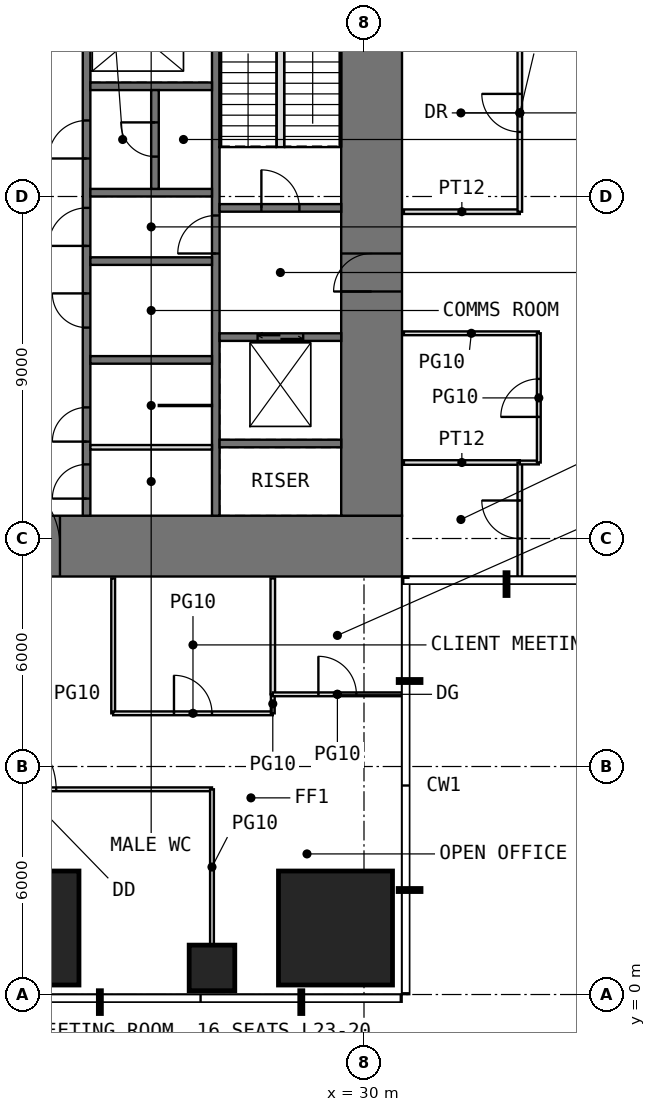
"""IFC4 building model, lengths in metres.
Left out: names, types, materials, properties, quantities, classifications, styles, units other than length and angle.
Written with IfcOpenShell. Run it as: python <this file> out.ifc"""

import sys

from ifc_helpers import new_model, si_unit, direction, frame, frame_2d, origin, origin_2d, place, context, subcontext, project, spatial, rectangle, extrude, element, fill, save


model = new_model("IFC4")
c1 = context("Model", 3, precision=1e-05, world=origin(), true_north=direction((0.0, 1.0)))
c2 = subcontext(c1, "Body", "Model", "MODEL_VIEW")
j1 = project(units=[si_unit("LENGTHUNIT", "METRE"), si_unit("PLANEANGLEUNIT", "RADIAN")], contexts=[c1])
p1 = place(None, origin())
s1 = spatial("IfcSite", under=j1, at=p1, CompositionType="ELEMENT")
p2 = place(p1, origin())
s2 = spatial("IfcBuilding", under=s1, at=p2, CompositionType="ELEMENT")
p3 = place(p2, frame((0.0, 0.0, 100.5)))
s3 = spatial("IfcBuildingStorey", under=s2, at=p3, CompositionType="ELEMENT", Elevation=100.5)
p4 = place(p3, frame((21.0, 1.75, 0.0), z_axis=(0.0, 0.0, 1.0), x_axis=(1.0, 0.0, 0.0)))
e1 = element("IfcColumn", 1, at=p4, inside=s3, PredefinedType="COLUMN", context=c2, shape_type="SweptSolid", body=[
    extrude(rectangle(XDim=3.0, YDim=3.0, at=origin_2d()), origin(), (0.0, 0.0, 1.0), 4.0),
])
p5 = place(p3, frame((26.0, 0.7, 0.0), z_axis=(0.0, 0.0, 1.0), x_axis=(1.0, 0.0, 0.0)))
e2 = element("IfcColumn", 2, at=p5, inside=s3, PredefinedType="COLUMN", context=c2, shape_type="SweptSolid", body=[
    extrude(rectangle(XDim=1.2, YDim=1.2, at=origin_2d()), origin(), (0.0, 0.0, 1.0), 4.0),
])
p6 = place(p3, frame((29.25, 1.75, 0.0), z_axis=(0.0, 0.0, 1.0), x_axis=(1.0, 0.0, 0.0)))
e3 = element("IfcColumn", 3, at=p6, inside=s3, PredefinedType="COLUMN", context=c2, shape_type="SweptSolid", body=[
    extrude(rectangle(XDim=3.0, YDim=3.0, at=origin_2d()), origin(), (0.0, 0.0, 1.0), 4.0),
])
p7 = place(p3, frame((11.0, 11.8, -0.05), z_axis=(0.0, 0.0, 1.0), x_axis=(1.0, 0.0, 0.0)))
e4 = element("IfcWall", 4, at=p7, inside=s3, PredefinedType="SHEAR", context=c2, shape_type="SweptSolid", body=[
    extrude(rectangle(XDim=20.0, YDim=1.6, at=frame_2d((10.0, 0.0))), origin(), (0.0, 0.0, 1.0), 4.0),
])
p8 = place(p7, frame((9.0, 0.0, 0.05)))
e5 = element("IfcOpeningElement", 5, at=p8, cuts=e4, PredefinedType="OPENING", context=c2, shape_type="SweptSolid", body=[
    extrude(rectangle(XDim=2.0, YDim=2.2, at=frame_2d((1.0, 1.1))), frame((0.0, 0.81, 0.0), z_axis=(0.0, -1.0, 0.0), x_axis=(1.0, 0.0, 0.0)), (0.0, 0.0, 1.0), 1.62),
])
p9 = place(p3, frame((30.2, 12.6, -0.05), z_axis=(0.0, 0.0, 1.0), x_axis=(0.0, 1.0, 0.0)))
e6 = element("IfcWall", 6, at=p9, inside=s3, PredefinedType="SHEAR", context=c2, shape_type="SweptSolid", body=[
    extrude(rectangle(XDim=16.8, YDim=1.6, at=frame_2d((8.4, 0.0))), origin(), (0.0, 0.0, 1.0), 4.0),
])
p10 = place(p9, frame((5.9, 0.0, 0.05)))
e7 = element("IfcOpeningElement", 7, at=p10, cuts=e6, PredefinedType="OPENING", context=c2, shape_type="SweptSolid", body=[
    extrude(rectangle(XDim=1.0, YDim=2.2, at=frame_2d((0.5, 1.1))), frame((0.0, 0.81, 0.0), z_axis=(0.0, -1.0, 0.0), x_axis=(1.0, 0.0, 0.0)), (0.0, 0.0, 1.0), 1.62),
])
p11 = place(p3, frame((22.7, 12.6, -0.05), z_axis=(0.0, 0.0, 1.0), x_axis=(0.0, 1.0, 0.0)))
e8 = element("IfcWall", 8, at=p11, inside=s3, PredefinedType="SHEAR", context=c2, shape_type="SweptSolid", body=[
    extrude(rectangle(XDim=16.8, YDim=0.2, at=frame_2d((8.4, 0.0))), origin(), (0.0, 0.0, 1.0), 4.0),
])
p12 = place(p11, frame((0.45, 0.0, 0.05)))
e9 = element("IfcOpeningElement", 9, at=p12, cuts=e8, PredefinedType="OPENING", context=c2, shape_type="SweptSolid", body=[
    extrude(rectangle(XDim=0.9, YDim=2.2, at=frame_2d((0.45, 1.1))), frame((0.0, 0.11, 0.0), z_axis=(0.0, -1.0, 0.0), x_axis=(1.0, 0.0, 0.0)), (0.0, 0.0, 1.0), 0.22),
])
p13 = place(p11, frame((7.1, 0.0, 0.05)))
e10 = element("IfcOpeningElement", 10, at=p13, cuts=e8, PredefinedType="OPENING", context=c2, shape_type="SweptSolid", body=[
    extrude(rectangle(XDim=1.0, YDim=2.2, at=frame_2d((0.5, 1.1))), frame((0.0, 0.11, 0.0), z_axis=(0.0, -1.0, 0.0), x_axis=(1.0, 0.0, 0.0)), (0.0, 0.0, 1.0), 0.22),
])
p14 = place(p11, frame((1.95, 0.0, 0.05)))
e11 = element("IfcOpeningElement", 11, at=p14, cuts=e8, PredefinedType="OPENING", context=c2, shape_type="SweptSolid", body=[
    extrude(rectangle(XDim=0.9, YDim=2.2, at=frame_2d((0.45, 1.1))), frame((0.0, 0.11, 0.0), z_axis=(0.0, -1.0, 0.0), x_axis=(1.0, 0.0, 0.0)), (0.0, 0.0, 1.0), 0.22),
])
p15 = place(p11, frame((4.95, 0.0, 0.05)))
e12 = element("IfcOpeningElement", 12, at=p15, cuts=e8, PredefinedType="OPENING", context=c2, shape_type="SweptSolid", body=[
    extrude(rectangle(XDim=0.9, YDim=2.2, at=frame_2d((0.45, 1.1))), frame((0.0, 0.11, 0.0), z_axis=(0.0, -1.0, 0.0), x_axis=(1.0, 0.0, 0.0)), (0.0, 0.0, 1.0), 0.22),
])
p16 = place(p11, frame((9.4, 0.0, 0.05)))
e13 = element("IfcOpeningElement", 13, at=p16, cuts=e8, PredefinedType="OPENING", context=c2, shape_type="SweptSolid", body=[
    extrude(rectangle(XDim=1.0, YDim=2.2, at=frame_2d((0.5, 1.1))), frame((0.0, 0.11, 0.0), z_axis=(0.0, -1.0, 0.0), x_axis=(1.0, 0.0, 0.0)), (0.0, 0.0, 1.0), 0.22),
])
p17 = place(p3, frame((26.1, 12.6, -0.05), z_axis=(0.0, 0.0, 1.0), x_axis=(0.0, 1.0, 0.0)))
e14 = element("IfcWall", 14, at=p17, inside=s3, PredefinedType="SHEAR", context=c2, shape_type="SweptSolid", body=[
    extrude(rectangle(XDim=16.8, YDim=0.2, at=frame_2d((8.4, 0.0))), origin(), (0.0, 0.0, 1.0), 4.0),
])
p18 = place(p17, frame((6.9, 0.0, 0.05)))
e15 = element("IfcOpeningElement", 15, at=p18, cuts=e14, PredefinedType="OPENING", context=c2, shape_type="SweptSolid", body=[
    extrude(rectangle(XDim=1.0, YDim=2.2, at=frame_2d((0.5, 1.1))), frame((0.0, 0.11, 0.0), z_axis=(0.0, -1.0, 0.0), x_axis=(1.0, 0.0, 0.0)), (0.0, 0.0, 1.0), 0.22),
])
for number, where, z_axis, x_axis in (
    (16, (22.8, 16.7, -0.05), (0.0, 0.0, 1.0), (1.0, 0.0, 0.0)),
    (17, (22.8, 19.3, -0.05), (0.0, 0.0, 1.0), (1.0, 0.0, 0.0)),
    (18, (22.8, 21.1, -0.05), (0.0, 0.0, 1.0), (1.0, 0.0, 0.0)),
    (19, (22.8, 23.9, -0.05), (0.0, 0.0, 1.0), (1.0, 0.0, 0.0)),
    (20, (26.2, 14.5, -0.05), (0.0, 0.0, 1.0), (1.0, 0.0, 0.0)),
):
    element("IfcWall", number, at=place(p3, frame(where, z_axis=z_axis, x_axis=x_axis)), inside=s3, PredefinedType="SHEAR", context=c2, shape_type="SweptSolid", body=[
        extrude(rectangle(XDim=3.2, YDim=0.2, at=frame_2d((1.6, 0.0))), origin(), (0.0, 0.0, 1.0), 4.0),
    ])
p19 = place(p3, frame((26.2, 17.3, -0.05), z_axis=(0.0, 0.0, 1.0), x_axis=(1.0, 0.0, 0.0)))
e21 = element("IfcWall", 21, at=p19, inside=s3, PredefinedType="SHEAR", context=c2, shape_type="SweptSolid", body=[
    extrude(rectangle(XDim=3.2, YDim=0.2, at=frame_2d((1.6, 0.0))), origin(), (0.0, 0.0, 1.0), 4.0),
])
p20 = place(p19, frame((1.0, 0.0, 0.05)))
e22 = element("IfcOpeningElement", 22, at=p20, cuts=e21, PredefinedType="OPENING", context=c2, shape_type="SweptSolid", body=[
    extrude(rectangle(XDim=1.2, YDim=2.2, at=frame_2d((0.6, 1.1))), frame((0.0, 0.11, 0.0), z_axis=(0.0, -1.0, 0.0), x_axis=(1.0, 0.0, 0.0)), (0.0, 0.0, 1.0), 0.22),
])
p21 = place(p3, frame((26.2, 20.7, -0.05), z_axis=(0.0, 0.0, 1.0), x_axis=(1.0, 0.0, 0.0)))
e23 = element("IfcWall", 23, at=p21, inside=s3, PredefinedType="SHEAR", context=c2, shape_type="SweptSolid", body=[
    extrude(rectangle(XDim=3.2, YDim=0.2, at=frame_2d((1.6, 0.0))), origin(), (0.0, 0.0, 1.0), 4.0),
])
p22 = place(p21, frame((1.1, 0.0, 0.05)))
e24 = element("IfcOpeningElement", 24, at=p22, cuts=e23, PredefinedType="OPENING", context=c2, shape_type="SweptSolid", body=[
    extrude(rectangle(XDim=1.0, YDim=2.2, at=frame_2d((0.5, 1.1))), frame((0.0, 0.11, 0.0), z_axis=(0.0, -1.0, 0.0), x_axis=(1.0, 0.0, 0.0)), (0.0, 0.0, 1.0), 0.22),
])
p23 = place(p3, frame((22.8, 14.4, 0.0), z_axis=(0.0, 0.0, 1.0), x_axis=(1.0, 0.0, 0.0)))
e25 = element("IfcWall", 25, at=p23, inside=s3, PredefinedType="PARTITIONING", context=c2, shape_type="SweptSolid", body=[
    extrude(rectangle(XDim=3.2, YDim=0.12, at=frame_2d((1.6, 0.0))), origin(), (0.0, 0.0, 1.0), 3.75),
])
p24 = place(p3, frame((24.6, 15.5, 0.0), z_axis=(0.0, 0.0, 1.0), x_axis=(1.0, 0.0, 0.0)))
e26 = element("IfcWall", 26, at=p24, inside=s3, PredefinedType="PARTITIONING", context=c2, shape_type="SweptSolid", body=[
    extrude(rectangle(XDim=1.4, YDim=0.03, at=frame_2d((0.7, 0.0))), origin(), (0.0, 0.0, 1.0), 3.75),
])
p25 = place(p3, frame((24.5, 21.2, -0.05), z_axis=(0.0, 0.0, 1.0), x_axis=(0.0, 1.0, 0.0)))
e27 = element("IfcWall", 27, at=p25, inside=s3, PredefinedType="SHEAR", context=c2, shape_type="SweptSolid", body=[
    extrude(rectangle(XDim=2.6, YDim=0.2, at=frame_2d((1.3, 0.0))), origin(), (0.0, 0.0, 1.0), 4.0),
])
p26 = place(p25, frame((0.85, 0.0, 0.05)))
e28 = element("IfcOpeningElement", 28, at=p26, cuts=e27, PredefinedType="OPENING", context=c2, shape_type="SweptSolid", body=[
    extrude(rectangle(XDim=0.9, YDim=2.2, at=frame_2d((0.45, 1.1))), frame((0.0, 0.11, 0.0), z_axis=(0.0, -1.0, 0.0), x_axis=(1.0, 0.0, 0.0)), (0.0, 0.0, 1.0), 0.22),
])
p27 = place(p3, frame((16.0, 5.4, 0.0), z_axis=(0.0, 0.0, 1.0), x_axis=(1.0, 0.0, 0.0)))
e29 = element("IfcWall", 29, at=p27, inside=s3, PredefinedType="PARTITIONING", context=c2, shape_type="SweptSolid", body=[
    extrude(rectangle(XDim=10.0, YDim=0.1, at=frame_2d((5.0, 0.0))), origin(), (0.0, 0.0, 1.0), 3.75),
])
p28 = place(p27, frame((4.1, 0.0, 0.0)))
e30 = element("IfcOpeningElement", 30, at=p28, cuts=e29, PredefinedType="OPENING", context=c2, shape_type="SweptSolid", body=[
    extrude(rectangle(XDim=1.8, YDim=2.4, at=frame_2d((0.9, 1.2))), frame((0.0, 0.06, 0.0), z_axis=(0.0, -1.0, 0.0), x_axis=(1.0, 0.0, 0.0)), (0.0, 0.0, 1.0), 0.12),
])
p29 = place(p3, frame((23.4, 7.4, 0.0), z_axis=(0.0, 0.0, 1.0), x_axis=(0.0, 1.0, 0.0)))
e31 = element("IfcWall", 31, at=p29, inside=s3, PredefinedType="PARTITIONING", context=c2, shape_type="SweptSolid", body=[
    extrude(rectangle(XDim=3.55, YDim=0.1, at=frame_2d((1.775, 0.0))), origin(), (0.0, 0.0, 1.0), 3.75),
])
p30 = place(p3, frame((23.4, 7.4, 0.0), z_axis=(0.0, 0.0, 1.0), x_axis=(1.0, 0.0, 0.0)))
e32 = element("IfcWall", 32, at=p30, inside=s3, PredefinedType="PARTITIONING", context=c2, shape_type="SweptSolid", body=[
    extrude(rectangle(XDim=4.2, YDim=0.1, at=frame_2d((2.1, 0.0))), origin(), (0.0, 0.0, 1.0), 3.75),
])
p31 = place(p30, frame((1.6, 0.0, 0.0)))
e33 = element("IfcOpeningElement", 33, at=p31, cuts=e32, PredefinedType="OPENING", context=c2, shape_type="SweptSolid", body=[
    extrude(rectangle(XDim=1.0, YDim=2.4, at=frame_2d((0.5, 1.2))), frame((0.0, 0.06, 0.0), z_axis=(0.0, -1.0, 0.0), x_axis=(1.0, 0.0, 0.0)), (0.0, 0.0, 1.0), 0.12),
])
p32 = place(p3, frame((26.0, 1.31, 0.0), z_axis=(0.0, 0.0, 1.0), x_axis=(0.0, 1.0, 0.0)))
e34 = element("IfcWall", 34, at=p32, inside=s3, PredefinedType="PARTITIONING", context=c2, shape_type="SweptSolid", body=[
    extrude(rectangle(XDim=4.09, YDim=0.1, at=frame_2d((2.045, 0.0))), origin(), (0.0, 0.0, 1.0), 3.75),
])
p33 = place(p3, frame((27.6, 7.4, 0.0), z_axis=(0.0, 0.0, 1.0), x_axis=(0.0, 1.0, 0.0)))
e35 = element("IfcWall", 35, at=p33, inside=s3, PredefinedType="PARTITIONING", context=c2, shape_type="SweptSolid", body=[
    extrude(rectangle(XDim=0.5, YDim=0.1, at=frame_2d((0.25, 0.0))), origin(), (0.0, 0.0, 1.0), 3.75),
])
p34 = place(p3, frame((27.6, 7.9, 0.0), z_axis=(0.0, 0.0, 1.0), x_axis=(0.0, 1.0, 0.0)))
e36 = element("IfcWall", 36, at=p34, inside=s3, PredefinedType="PARTITIONING", context=c2, shape_type="SweptSolid", body=[
    extrude(rectangle(XDim=3.05, YDim=0.12, at=frame_2d((1.525, 0.0))), origin(), (0.0, 0.0, 1.0), 3.75),
])
p35 = place(p3, frame((27.6, 7.9, 0.0), z_axis=(0.0, 0.0, 1.0), x_axis=(1.0, 0.0, 0.0)))
e37 = element("IfcWall", 37, at=p35, inside=s3, PredefinedType="PARTITIONING", context=c2, shape_type="SweptSolid", body=[
    extrude(rectangle(XDim=3.4, YDim=0.1, at=frame_2d((1.7, 0.0))), origin(), (0.0, 0.0, 1.0), 3.75),
])
p36 = place(p35, frame((1.2, 0.0, 0.0)))
e38 = element("IfcOpeningElement", 38, at=p36, cuts=e37, PredefinedType="OPENING", context=c2, shape_type="SweptSolid", body=[
    extrude(rectangle(XDim=1.0, YDim=2.4, at=frame_2d((0.5, 1.2))), frame((0.0, 0.06, 0.0), z_axis=(0.0, -1.0, 0.0), x_axis=(1.0, 0.0, 0.0)), (0.0, 0.0, 1.0), 0.12),
])
p37 = place(p3, frame((31.05, 14.0, 0.0), z_axis=(0.0, 0.0, 1.0), x_axis=(1.0, 0.0, 0.0)))
e39 = element("IfcWall", 39, at=p37, inside=s3, PredefinedType="PARTITIONING", context=c2, shape_type="SweptSolid", body=[
    extrude(rectangle(XDim=3.05, YDim=0.12, at=frame_2d((1.525, 0.0))), origin(), (0.0, 0.0, 1.0), 3.75),
])
p38 = place(p3, frame((31.05, 17.4, 0.0), z_axis=(0.0, 0.0, 1.0), x_axis=(1.0, 0.0, 0.0)))
e40 = element("IfcWall", 40, at=p38, inside=s3, PredefinedType="PARTITIONING", context=c2, shape_type="SweptSolid", body=[
    extrude(rectangle(XDim=3.55, YDim=0.1, at=frame_2d((1.775, 0.0))), origin(), (0.0, 0.0, 1.0), 3.75),
])
p39 = place(p3, frame((31.05, 20.6, 0.0), z_axis=(0.0, 0.0, 1.0), x_axis=(1.0, 0.0, 0.0)))
e41 = element("IfcWall", 41, at=p39, inside=s3, PredefinedType="PARTITIONING", context=c2, shape_type="SweptSolid", body=[
    extrude(rectangle(XDim=3.05, YDim=0.12, at=frame_2d((1.525, 0.0))), origin(), (0.0, 0.0, 1.0), 3.75),
])
p40 = place(p3, frame((34.1, 11.0, 0.0), z_axis=(0.0, 0.0, 1.0), x_axis=(0.0, 1.0, 0.0)))
e42 = element("IfcWall", 42, at=p40, inside=s3, PredefinedType="PARTITIONING", context=c2, shape_type="SweptSolid", body=[
    extrude(rectangle(XDim=3.0, YDim=0.12, at=frame_2d((1.5, 0.0))), origin(), (0.0, 0.0, 1.0), 3.75),
])
p41 = place(p40, frame((1.0, 0.0, 0.0)))
e43 = element("IfcOpeningElement", 43, at=p41, cuts=e42, PredefinedType="OPENING", context=c2, shape_type="SweptSolid", body=[
    extrude(rectangle(XDim=1.0, YDim=2.2, at=frame_2d((0.5, 1.1))), frame((0.0, 0.07, 0.0), z_axis=(0.0, -1.0, 0.0), x_axis=(1.0, 0.0, 0.0)), (0.0, 0.0, 1.0), 0.14),
])
p42 = place(p3, frame((34.1, 14.0, 0.0), z_axis=(0.0, 0.0, 1.0), x_axis=(1.0, 0.0, 0.0)))
e44 = element("IfcWall", 44, at=p42, inside=s3, PredefinedType="PARTITIONING", context=c2, shape_type="SweptSolid", body=[
    extrude(rectangle(XDim=0.5, YDim=0.1, at=frame_2d((0.25, 0.0))), origin(), (0.0, 0.0, 1.0), 3.75),
])
p43 = place(p3, frame((34.1, 20.6, 0.0), z_axis=(0.0, 0.0, 1.0), x_axis=(0.0, 1.0, 0.0)))
e45 = element("IfcWall", 45, at=p43, inside=s3, PredefinedType="PARTITIONING", context=c2, shape_type="SweptSolid", body=[
    extrude(rectangle(XDim=5.2, YDim=0.12, at=frame_2d((2.6, 0.0))), origin(), (0.0, 0.0, 1.0), 3.75),
])
p44 = place(p43, frame((2.1, 0.0, 0.0)))
e46 = element("IfcOpeningElement", 46, at=p44, cuts=e45, PredefinedType="OPENING", context=c2, shape_type="SweptSolid", body=[
    extrude(rectangle(XDim=1.0, YDim=2.2, at=frame_2d((0.5, 1.1))), frame((0.0, 0.07, 0.0), z_axis=(0.0, -1.0, 0.0), x_axis=(1.0, 0.0, 0.0)), (0.0, 0.0, 1.0), 0.14),
])
p45 = place(p3, frame((34.6, 14.0, 0.0), z_axis=(0.0, 0.0, 1.0), x_axis=(0.0, 1.0, 0.0)))
e47 = element("IfcWall", 47, at=p45, inside=s3, PredefinedType="PARTITIONING", context=c2, shape_type="SweptSolid", body=[
    extrude(rectangle(XDim=3.4, YDim=0.1, at=frame_2d((1.7, 0.0))), origin(), (0.0, 0.0, 1.0), 3.75),
])
p46 = place(p45, frame((1.2, 0.0, 0.0)))
e48 = element("IfcOpeningElement", 48, at=p46, cuts=e47, PredefinedType="OPENING", context=c2, shape_type="SweptSolid", body=[
    extrude(rectangle(XDim=1.0, YDim=2.4, at=frame_2d((0.5, 1.2))), frame((0.0, 0.06, 0.0), z_axis=(0.0, -1.0, 0.0), x_axis=(1.0, 0.0, 0.0)), (0.0, 0.0, 1.0), 0.12),
])
p47 = place(p3, frame((27.8, 22.3, 0.0), z_axis=(0.0, 0.0, 1.0), x_axis=(0.0, 1.0, 0.0)))
e49 = element("IfcWall", 49, at=p47, inside=s3, PredefinedType="PARTITIONING", context=c2, shape_type="SweptSolid", body=[
    extrude(rectangle(XDim=3.08, YDim=0.2, at=frame_2d((1.54, 0.0))), origin(), (0.0, 0.0, 1.0), 4.0),
])
p48 = place(p8, origin())
e50 = element("IfcDoor", 50, at=p48, inside=s3, OperationType="DOUBLE_DOOR_SINGLE_SWING", PredefinedType="DOOR", context=c2, shape_type="SweptSolid", body=[
    extrude(rectangle(XDim=2.0, YDim=2.2, at=frame_2d((1.0, 1.1))), frame((0.0, 0.025, 0.0), z_axis=(0.0, -1.0, 0.0), x_axis=(1.0, 0.0, 0.0)), (0.0, 0.0, 1.0), 0.05),
])
fill(e5, e50)
p49 = place(p12, origin())
e51 = element("IfcDoor", 51, at=p49, inside=s3, OperationType="SINGLE_SWING_LEFT", PredefinedType="DOOR", context=c2, shape_type="SweptSolid", body=[
    extrude(rectangle(XDim=0.9, YDim=2.2, at=frame_2d((0.45, 1.1))), frame((0.0, 0.025, 0.0), z_axis=(0.0, -1.0, 0.0), x_axis=(1.0, 0.0, 0.0)), (0.0, 0.0, 1.0), 0.05),
])
fill(e9, e51)
p50 = place(p10, origin())
e52 = element("IfcDoor", 52, at=p50, inside=s3, OperationType="SINGLE_SWING_LEFT", PredefinedType="DOOR", context=c2, shape_type="SweptSolid", body=[
    extrude(rectangle(XDim=1.0, YDim=2.2, at=frame_2d((0.5, 1.1))), frame((0.0, 0.025, 0.0), z_axis=(0.0, -1.0, 0.0), x_axis=(1.0, 0.0, 0.0)), (0.0, 0.0, 1.0), 0.05),
])
fill(e7, e52)
p51 = place(p22, origin())
e53 = element("IfcDoor", 53, at=p51, inside=s3, OperationType="SINGLE_SWING_LEFT", PredefinedType="DOOR", context=c2, shape_type="SweptSolid", body=[
    extrude(rectangle(XDim=1.0, YDim=2.2, at=frame_2d((0.5, 1.1))), frame((0.0, 0.025, 0.0), z_axis=(0.0, -1.0, 0.0), x_axis=(1.0, 0.0, 0.0)), (0.0, 0.0, 1.0), 0.05),
])
fill(e24, e53)
p52 = place(p18, origin())
e54 = element("IfcDoor", 54, at=p52, inside=s3, OperationType="SINGLE_SWING_LEFT", PredefinedType="DOOR", context=c2, shape_type="SweptSolid", body=[
    extrude(rectangle(XDim=1.0, YDim=2.2, at=frame_2d((0.5, 1.1))), frame((0.0, 0.025, 0.0), z_axis=(0.0, -1.0, 0.0), x_axis=(1.0, 0.0, 0.0)), (0.0, 0.0, 1.0), 0.05),
])
fill(e15, e54)
p53 = place(p13, origin())
e55 = element("IfcDoor", 55, at=p53, inside=s3, OperationType="SINGLE_SWING_LEFT", PredefinedType="DOOR", context=c2, shape_type="SweptSolid", body=[
    extrude(rectangle(XDim=1.0, YDim=2.2, at=frame_2d((0.5, 1.1))), frame((0.0, 0.025, 0.0), z_axis=(0.0, -1.0, 0.0), x_axis=(1.0, 0.0, 0.0)), (0.0, 0.0, 1.0), 0.05),
])
fill(e10, e55)
p54 = place(p14, origin())
e56 = element("IfcDoor", 56, at=p54, inside=s3, OperationType="SINGLE_SWING_LEFT", PredefinedType="DOOR", context=c2, shape_type="SweptSolid", body=[
    extrude(rectangle(XDim=0.9, YDim=2.2, at=frame_2d((0.45, 1.1))), frame((0.0, 0.025, 0.0), z_axis=(0.0, -1.0, 0.0), x_axis=(1.0, 0.0, 0.0)), (0.0, 0.0, 1.0), 0.05),
])
fill(e11, e56)
p55 = place(p15, origin())
e57 = element("IfcDoor", 57, at=p55, inside=s3, OperationType="SINGLE_SWING_RIGHT", PredefinedType="DOOR", context=c2, shape_type="SweptSolid", body=[
    extrude(rectangle(XDim=0.9, YDim=2.2, at=frame_2d((0.45, 1.1))), frame((0.0, 0.025, 0.0), z_axis=(0.0, -1.0, 0.0), x_axis=(1.0, 0.0, 0.0)), (0.0, 0.0, 1.0), 0.05),
])
fill(e12, e57)
p56 = place(p16, origin())
e58 = element("IfcDoor", 58, at=p56, inside=s3, OperationType="SINGLE_SWING_LEFT", PredefinedType="DOOR", context=c2, shape_type="SweptSolid", body=[
    extrude(rectangle(XDim=1.0, YDim=2.2, at=frame_2d((0.5, 1.1))), frame((0.0, 0.025, 0.0), z_axis=(0.0, -1.0, 0.0), x_axis=(1.0, 0.0, 0.0)), (0.0, 0.0, 1.0), 0.05),
])
fill(e13, e58)
p57 = place(p26, origin())
e59 = element("IfcDoor", 59, at=p57, inside=s3, OperationType="SINGLE_SWING_RIGHT", PredefinedType="DOOR", context=c2, shape_type="SweptSolid", body=[
    extrude(rectangle(XDim=0.9, YDim=2.2, at=frame_2d((0.45, 1.1))), frame((0.0, 0.025, 0.0), z_axis=(0.0, -1.0, 0.0), x_axis=(1.0, 0.0, 0.0)), (0.0, 0.0, 1.0), 0.05),
])
fill(e28, e59)
p58 = place(p31, origin())
e60 = element("IfcDoor", 60, at=p58, inside=s3, OperationType="SINGLE_SWING_LEFT", PredefinedType="DOOR", context=c2, shape_type="SweptSolid", body=[
    extrude(rectangle(XDim=1.0, YDim=2.4, at=frame_2d((0.5, 1.2))), frame((0.0, 0.025, 0.0), z_axis=(0.0, -1.0, 0.0), x_axis=(1.0, 0.0, 0.0)), (0.0, 0.0, 1.0), 0.05),
])
fill(e33, e60)
p59 = place(p36, origin())
e61 = element("IfcDoor", 61, at=p59, inside=s3, OperationType="SINGLE_SWING_LEFT", PredefinedType="DOOR", context=c2, shape_type="SweptSolid", body=[
    extrude(rectangle(XDim=1.0, YDim=2.4, at=frame_2d((0.5, 1.2))), frame((0.0, 0.025, 0.0), z_axis=(0.0, -1.0, 0.0), x_axis=(1.0, 0.0, 0.0)), (0.0, 0.0, 1.0), 0.05),
])
fill(e38, e61)
p60 = place(p28, origin())
e62 = element("IfcDoor", 62, at=p60, inside=s3, OperationType="DOUBLE_DOOR_SINGLE_SWING", PredefinedType="DOOR", context=c2, shape_type="SweptSolid", body=[
    extrude(rectangle(XDim=1.8, YDim=2.4, at=frame_2d((0.9, 1.2))), frame((0.0, 0.025, 0.0), z_axis=(0.0, -1.0, 0.0), x_axis=(1.0, 0.0, 0.0)), (0.0, 0.0, 1.0), 0.05),
])
fill(e30, e62)
p61 = place(p41, origin())
e63 = element("IfcDoor", 63, at=p61, inside=s3, OperationType="SINGLE_SWING_RIGHT", PredefinedType="DOOR", context=c2, shape_type="SweptSolid", body=[
    extrude(rectangle(XDim=1.0, YDim=2.2, at=frame_2d((0.5, 1.1))), frame((0.0, 0.025, 0.0), z_axis=(0.0, -1.0, 0.0), x_axis=(1.0, 0.0, 0.0)), (0.0, 0.0, 1.0), 0.05),
])
fill(e43, e63)
p62 = place(p46, origin())
e64 = element("IfcDoor", 64, at=p62, inside=s3, OperationType="SINGLE_SWING_LEFT", PredefinedType="DOOR", context=c2, shape_type="SweptSolid", body=[
    extrude(rectangle(XDim=1.0, YDim=2.4, at=frame_2d((0.5, 1.2))), frame((0.0, 0.025, 0.0), z_axis=(0.0, -1.0, 0.0), x_axis=(1.0, 0.0, 0.0)), (0.0, 0.0, 1.0), 0.05),
])
fill(e48, e64)
p63 = place(p44, origin())
e65 = element("IfcDoor", 65, at=p63, inside=s3, OperationType="SINGLE_SWING_RIGHT", PredefinedType="DOOR", context=c2, shape_type="SweptSolid", body=[
    extrude(rectangle(XDim=1.0, YDim=2.2, at=frame_2d((0.5, 1.1))), frame((0.0, 0.025, 0.0), z_axis=(0.0, -1.0, 0.0), x_axis=(1.0, 0.0, 0.0)), (0.0, 0.0, 1.0), 0.05),
])
fill(e46, e65)
p64 = place(p20, origin())
e66 = element("IfcDoor", 66, at=p64, inside=s3, OperationType="DOUBLE_DOOR_SLIDING", PredefinedType="DOOR", context=c2, shape_type="SweptSolid", body=[
    extrude(rectangle(XDim=1.2, YDim=2.2, at=frame_2d((0.6, 1.1))), frame((0.0, 0.025, 0.0), z_axis=(0.0, -1.0, 0.0), x_axis=(1.0, 0.0, 0.0)), (0.0, 0.0, 1.0), 0.05),
])
fill(e22, e66)
save(model, sys.argv[1])
